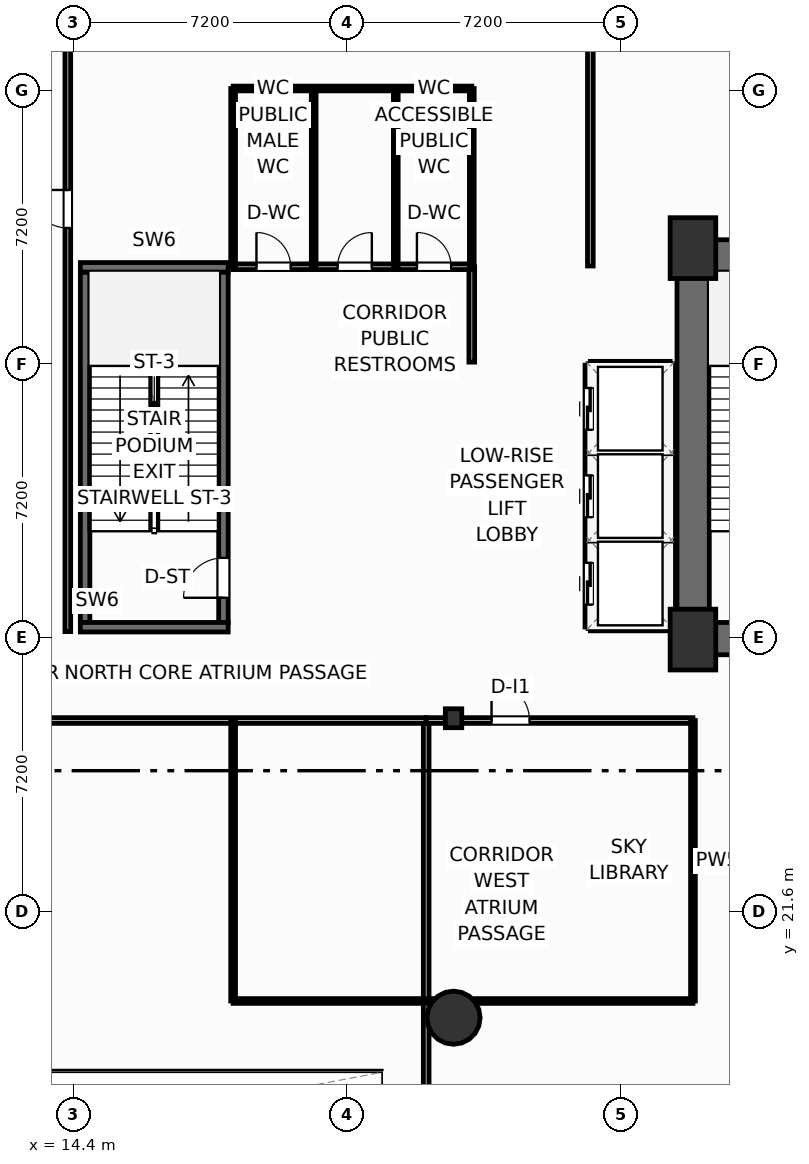
"""IFC4 building model, lengths in metres.
Left out: names, types, materials, properties, quantities, classifications, styles, units other than length and angle.
Written with IfcOpenShell. Run it as: python <this file> out.ifc"""

import sys

from ifc_helpers import new_model, si_unit, direction, frame, frame_2d, origin, origin_2d, place, context, subcontext, project, spatial, rectangle, circle, i_section, extrude, element, fill, save


model = new_model("IFC4")
c1 = context("Model", 3, precision=1e-05, world=origin(), true_north=direction((0.0, 1.0)))
c2 = subcontext(c1, "Body", "Model", "MODEL_VIEW")
j1 = project(units=[si_unit("LENGTHUNIT", "METRE"), si_unit("PLANEANGLEUNIT", "RADIAN")], contexts=[c1])
p1 = place(None, origin())
s1 = spatial("IfcSite", under=j1, at=p1, CompositionType="ELEMENT")
p2 = place(p1, origin())
s2 = spatial("IfcBuilding", under=s1, at=p2, CompositionType="ELEMENT")
p3 = place(p2, frame((0.0, 0.0, 10.8)))
s3 = spatial("IfcBuildingStorey", under=s2, at=p3, CompositionType="ELEMENT", Elevation=10.8)
for number, where, z_axis, x_axis in (
    (1, (30.7, 28.75, 0.0), (0.0, 0.0, 1.0), (1.0, 0.0, 0.0)),
    (2, (30.7, 39.05, 0.0), (0.0, 0.0, 1.0), (1.0, 0.0, 0.0)),
):
    element("IfcColumn", number, at=place(p3, frame(where, z_axis=z_axis, x_axis=x_axis)), inside=s3, PredefinedType="COLUMN", context=c2, shape_type="SweptSolid", body=[
        extrude(rectangle(XDim=1.2, YDim=1.6, at=origin_2d()), origin(), (0.0, 0.0, 1.0), 5.4),
    ])
p4 = place(p3, frame((24.4, 26.68, 0.0), z_axis=(0.0, 0.0, 1.0), x_axis=(1.0, 0.0, 0.0)))
e3 = element("IfcColumn", 3, at=p4, inside=s3, PredefinedType="COLUMN", context=c2, shape_type="SweptSolid", body=[
    extrude(i_section(OverallWidth=0.432, OverallDepth=0.498, WebThickness=0.056, FlangeThickness=0.089, FilletRadius=0.025, at=origin_2d()), origin(), (0.0, 0.0, 1.0), 5.4),
])
p5 = place(p3, frame((30.28, 38.845, 0.0), z_axis=(0.0, 0.0, 1.0), x_axis=(1.0, 0.0, 0.0)))
e4 = element("IfcWall", 4, at=p5, inside=s3, PredefinedType="SHEAR", context=c2, shape_type="SweptSolid", body=[
    extrude(rectangle(XDim=17.84, YDim=0.85, at=frame_2d((8.92, 0.0))), origin(), (0.0, 0.0, 1.0), 5.12),
])
p6 = place(p3, frame((30.705, 29.2, 0.0), z_axis=(0.0, 0.0, 1.0), x_axis=(0.0, 1.0, 0.0)))
e5 = element("IfcWall", 5, at=p6, inside=s3, PredefinedType="SHEAR", context=c2, shape_type="SweptSolid", body=[
    extrude(rectangle(XDim=9.22, YDim=0.85, at=frame_2d((4.61, 0.0))), origin(), (0.0, 0.0, 1.0), 5.12),
])
p7 = place(p3, frame((30.28, 28.775, 0.0), z_axis=(0.0, 0.0, 1.0), x_axis=(1.0, 0.0, 0.0)))
e6 = element("IfcWall", 6, at=p7, inside=s3, PredefinedType="SHEAR", context=c2, shape_type="SweptSolid", body=[
    extrude(rectangle(XDim=4.52, YDim=0.85, at=frame_2d((2.26, 0.0))), origin(), (0.0, 0.0, 1.0), 5.12),
])
p8 = place(p3, frame((14.705, 29.2, 0.0), z_axis=(0.0, 0.0, 1.0), x_axis=(0.0, 1.0, 0.0)))
e7 = element("IfcWall", 7, at=p8, inside=s3, PredefinedType="SHEAR", context=c2, shape_type="SweptSolid", body=[
    extrude(rectangle(XDim=9.22, YDim=0.25, at=frame_2d((4.61, 0.0))), origin(), (0.0, 0.0, 1.0), 5.12),
])
p9 = place(p3, frame((18.345, 29.2, 0.0), z_axis=(0.0, 0.0, 1.0), x_axis=(0.0, 1.0, 0.0)))
e8 = element("IfcWall", 8, at=p9, inside=s3, PredefinedType="SHEAR", context=c2, shape_type="SweptSolid", body=[
    extrude(rectangle(XDim=9.22, YDim=0.25, at=frame_2d((4.61, 0.0))), origin(), (0.0, 0.0, 1.0), 5.12),
])
p10 = place(p9, frame((0.65, 0.0, 0.0)))
e9 = element("IfcOpeningElement", 9, at=p10, cuts=e8, PredefinedType="OPENING", context=c2, shape_type="SweptSolid", body=[
    extrude(rectangle(XDim=1.05, YDim=2.15, at=frame_2d((0.525, 1.075))), frame((0.0, 0.135, 0.0), z_axis=(0.0, -1.0, 0.0), x_axis=(1.0, 0.0, 0.0)), (0.0, 0.0, 1.0), 0.27),
])
for number, where, z_axis, x_axis in (
    (10, (14.58, 38.545, 0.0), (0.0, 0.0, 1.0), (1.0, 0.0, 0.0)),
    (11, (14.58, 29.075, 0.0), (0.0, 0.0, 1.0), (1.0, 0.0, 0.0)),
):
    element("IfcWall", number, at=place(p3, frame(where, z_axis=z_axis, x_axis=x_axis)), inside=s3, PredefinedType="SHEAR", context=c2, shape_type="SweptSolid", body=[
        extrude(rectangle(XDim=3.89, YDim=0.25, at=frame_2d((1.945, 0.0))), origin(), (0.0, 0.0, 1.0), 5.12),
    ])
p11 = place(p3, frame((24.4, 18.8, 0.0), z_axis=(0.0, 0.0, 1.0), x_axis=(1.0, 0.0, 0.0)))
e12 = element("IfcColumn", 12, at=p11, inside=s3, PredefinedType="COLUMN", context=c2, shape_type="SweptSolid", body=[
    extrude(circle(Radius=0.7, at=origin_2d()), origin(), (0.0, 0.0, 1.0), 5.4),
])
p12 = place(p3, frame((24.88, 36.05, 0.0), z_axis=(0.0, 0.0, 1.0), x_axis=(0.0, 1.0, 0.0)))
e13 = element("IfcWall", 13, at=p12, inside=s3, PredefinedType="PARTITIONING", context=c2, shape_type="SweptSolid", body=[
    extrude(rectangle(XDim=2.51, YDim=0.15, at=frame_2d((1.255, 0.0))), origin(), (0.0, 0.0, 1.0), 5.12),
])
p13 = place(p3, frame((18.6, 38.56, 0.0), z_axis=(0.0, 0.0, 1.0), x_axis=(1.0, 0.0, 0.0)))
e14 = element("IfcWall", 14, at=p13, inside=s3, PredefinedType="PARTITIONING", context=c2, shape_type="SweptSolid", body=[
    extrude(rectangle(XDim=6.28, YDim=0.15, at=frame_2d((3.14, 0.0))), origin(), (0.0, 0.0, 1.0), 5.12),
])
p14 = place(p13, frame((0.614, 0.0, 0.0)))
e15 = element("IfcOpeningElement", 15, at=p14, cuts=e14, PredefinedType="OPENING", context=c2, shape_type="SweptSolid", body=[
    extrude(rectangle(XDim=0.9, YDim=2.05, at=frame_2d((0.45, 1.025))), frame((0.0, 0.085, 0.0), z_axis=(0.0, -1.0, 0.0), x_axis=(1.0, 0.0, 0.0)), (0.0, 0.0, 1.0), 0.17),
])
p15 = place(p13, frame((2.75, 0.0, 0.0)))
e16 = element("IfcOpeningElement", 16, at=p15, cuts=e14, PredefinedType="OPENING", context=c2, shape_type="SweptSolid", body=[
    extrude(rectangle(XDim=0.9, YDim=2.05, at=frame_2d((0.45, 1.025))), frame((0.0, 0.085, 0.0), z_axis=(0.0, -1.0, 0.0), x_axis=(1.0, 0.0, 0.0)), (0.0, 0.0, 1.0), 0.17),
])
p16 = place(p13, frame((4.836, 0.0, 0.0)))
e17 = element("IfcOpeningElement", 17, at=p16, cuts=e14, PredefinedType="OPENING", context=c2, shape_type="SweptSolid", body=[
    extrude(rectangle(XDim=0.9, YDim=2.05, at=frame_2d((0.45, 1.025))), frame((0.0, 0.085, 0.0), z_axis=(0.0, -1.0, 0.0), x_axis=(1.0, 0.0, 0.0)), (0.0, 0.0, 1.0), 0.17),
])
for number, where, z_axis, x_axis in (
    (18, (18.6, 38.56, 0.0), (0.0, 0.0, 1.0), (0.0, 1.0, 0.0)),
    (19, (20.72, 38.56, 0.0), (0.0, 0.0, 1.0), (0.0, 1.0, 0.0)),
    (20, (22.88, 38.56, 0.0), (0.0, 0.0, 1.0), (0.0, 1.0, 0.0)),
    (21, (24.88, 38.56, 0.0), (0.0, 0.0, 1.0), (0.0, 1.0, 0.0)),
):
    element("IfcWall", number, at=place(p3, frame(where, z_axis=z_axis, x_axis=x_axis)), inside=s3, PredefinedType="PARTITIONING", context=c2, shape_type="SweptSolid", body=[
        extrude(rectangle(XDim=4.69, YDim=0.125, at=frame_2d((2.345, 0.0))), origin(), (0.0, 0.0, 1.0), 5.12),
    ])
p17 = place(p3, frame((18.6, 43.25, 0.0), z_axis=(0.0, 0.0, 1.0), x_axis=(1.0, 0.0, 0.0)))
e22 = element("IfcWall", 22, at=p17, inside=s3, PredefinedType="PARTITIONING", context=c2, shape_type="SweptSolid", body=[
    extrude(rectangle(XDim=6.28, YDim=0.125, at=frame_2d((3.14, 0.0))), origin(), (0.0, 0.0, 1.0), 5.12),
])
p18 = place(p3, frame((28.0, 38.58, 0.0), z_axis=(0.0, 0.0, 1.0), x_axis=(0.0, 1.0, 0.0)))
e23 = element("IfcWall", 23, at=p18, inside=s3, PredefinedType="PARTITIONING", context=c2, shape_type="SweptSolid", body=[
    extrude(rectangle(XDim=11.62, YDim=0.15, at=frame_2d((5.81, 0.0))), origin(), (0.0, 0.0, 1.0), 5.12),
])
p19 = place(p3, frame((23.68, 0.25, 0.0), z_axis=(0.0, 0.0, 1.0), x_axis=(0.0, 1.0, 0.0)))
e24 = element("IfcWall", 24, at=p19, inside=s3, PredefinedType="PARTITIONING", context=c2, shape_type="SweptSolid", body=[
    extrude(rectangle(XDim=26.37, YDim=0.15, at=frame_2d((13.185, 0.0))), origin(), (0.0, 0.0, 1.0), 5.12),
])
p20 = place(p19, frame((14.514, 0.0, 0.0)))
e25 = element("IfcOpeningElement", 25, at=p20, cuts=e24, PredefinedType="OPENING", context=c2, shape_type="SweptSolid", body=[
    extrude(rectangle(XDim=2.0, YDim=2.05, at=frame_2d((1.0, 1.025))), frame((0.0, 0.085, 0.0), z_axis=(0.0, -1.0, 0.0), x_axis=(1.0, 0.0, 0.0)), (0.0, 0.0, 1.0), 0.17),
])
p21 = place(p3, frame((0.2, 26.62, 0.0), z_axis=(0.0, 0.0, 1.0), x_axis=(1.0, 0.0, 0.0)))
e26 = element("IfcWall", 26, at=p21, inside=s3, PredefinedType="PARTITIONING", context=c2, shape_type="SweptSolid", body=[
    extrude(rectangle(XDim=23.48, YDim=0.15, at=frame_2d((11.74, 0.0))), origin(), (0.0, 0.0, 1.0), 5.12),
])
p22 = place(p3, frame((14.25, 28.96, 0.0), z_axis=(0.0, 0.0, 1.0), x_axis=(0.0, 1.0, 0.0)))
e27 = element("IfcWall", 27, at=p22, inside=s3, PredefinedType="PARTITIONING", context=c2, shape_type="SweptSolid", body=[
    extrude(rectangle(XDim=21.34, YDim=0.15, at=frame_2d((10.67, 0.0))), origin(), (0.0, 0.0, 1.0), 5.12),
])
p23 = place(p22, frame((10.62, 0.0, 0.0)))
e28 = element("IfcOpeningElement", 28, at=p23, cuts=e27, PredefinedType="OPENING", context=c2, shape_type="SweptSolid", body=[
    extrude(rectangle(XDim=1.0, YDim=2.05, at=frame_2d((0.5, 1.025))), frame((0.0, 0.085, 0.0), z_axis=(0.0, -1.0, 0.0), x_axis=(1.0, 0.0, 0.0)), (0.0, 0.0, 1.0), 0.17),
])
p24 = place(p3, frame((23.68, 26.62, 0.0), z_axis=(0.0, 0.0, 1.0), x_axis=(1.0, 0.0, 0.0)))
e29 = element("IfcWall", 29, at=p24, inside=s3, PredefinedType="PARTITIONING", context=c2, shape_type="SweptSolid", body=[
    extrude(rectangle(XDim=7.02, YDim=0.15, at=frame_2d((3.51, 0.0))), origin(), (0.0, 0.0, 1.0), 4.332),
])
p25 = place(p24, frame((1.72, 0.0, 0.0)))
e30 = element("IfcOpeningElement", 30, at=p25, cuts=e29, PredefinedType="OPENING", context=c2, shape_type="SweptSolid", body=[
    extrude(rectangle(XDim=1.0, YDim=2.05, at=frame_2d((0.5, 1.025))), frame((0.0, 0.085, 0.0), z_axis=(0.0, -1.0, 0.0), x_axis=(1.0, 0.0, 0.0)), (0.0, 0.0, 1.0), 0.17),
])
p26 = place(p3, frame((30.7, 19.24, 0.0), z_axis=(0.0, 0.0, 1.0), x_axis=(0.0, 1.0, 0.0)))
e31 = element("IfcWall", 31, at=p26, inside=s3, PredefinedType="PARTITIONING", context=c2, shape_type="SweptSolid", body=[
    extrude(rectangle(XDim=7.38, YDim=0.125, at=frame_2d((3.69, 0.0))), origin(), (0.0, 0.0, 1.0), 5.12),
])
p27 = place(p3, frame((18.6, 19.24, 0.0), z_axis=(0.0, 0.0, 1.0), x_axis=(0.0, 1.0, 0.0)))
e32 = element("IfcWall", 32, at=p27, inside=s3, PredefinedType="PARTITIONING", context=c2, shape_type="SweptSolid", body=[
    extrude(rectangle(XDim=7.34, YDim=0.125, at=frame_2d((3.67, 0.0))), origin(), (0.0, 0.0, 1.0), 5.12),
])
p28 = place(p3, frame((18.6, 19.24, 0.0), z_axis=(0.0, 0.0, 1.0), x_axis=(1.0, 0.0, 0.0)))
e33 = element("IfcWall", 33, at=p28, inside=s3, PredefinedType="PARTITIONING", context=c2, shape_type="SweptSolid", body=[
    extrude(rectangle(XDim=12.1, YDim=0.125, at=frame_2d((6.05, 0.0))), origin(), (0.0, 0.0, 1.0), 5.12),
])
for number, where, z_axis, x_axis in (
    (34, (28.02, 31.375, 0.0), (0.0, 0.0, 1.0), (1.0, 0.0, 0.0)),
    (35, (28.02, 33.675, 0.0), (0.0, 0.0, 1.0), (1.0, 0.0, 0.0)),
):
    element("IfcWall", number, at=place(p3, frame(where, z_axis=z_axis, x_axis=x_axis)), inside=s3, PredefinedType="PARTITIONING", context=c2, shape_type="SweptSolid", body=[
        extrude(rectangle(XDim=2.06, YDim=0.2, at=frame_2d((1.03, 0.0))), origin(), (0.0, 0.0, 1.0), 5.12),
    ])
for number, where, z_axis, x_axis in (
    (36, (28.0, 29.08, 0.0), (0.0, 0.0, 1.0), (1.0, 0.0, 0.0)),
    (37, (28.0, 35.97, 0.0), (0.0, 0.0, 1.0), (1.0, 0.0, 0.0)),
):
    element("IfcWall", number, at=place(p3, frame(where, z_axis=z_axis, x_axis=x_axis)), inside=s3, PredefinedType="PARTITIONING", context=c2, shape_type="SweptSolid", body=[
        extrude(rectangle(XDim=2.1, YDim=0.2, at=frame_2d((1.05, 0.0))), origin(), (0.0, 0.0, 1.0), 5.12),
    ])
p29 = place(p3, frame((30.12, 29.08, 0.0), z_axis=(0.0, 0.0, 1.0), x_axis=(0.0, 1.0, 0.0)))
e38 = element("IfcWall", 38, at=p29, inside=s3, PredefinedType="PARTITIONING", context=c2, shape_type="SweptSolid", body=[
    extrude(rectangle(XDim=6.89, YDim=0.2, at=frame_2d((3.445, 0.0))), origin(), (0.0, 0.0, 1.0), 5.12),
])
p30 = place(p3, frame((27.96, 29.08, 0.0), z_axis=(0.0, 0.0, 1.0), x_axis=(0.0, 1.0, 0.0)))
e39 = element("IfcWall", 39, at=p30, inside=s3, PredefinedType="PARTITIONING", context=c2, shape_type="SweptSolid", body=[
    extrude(rectangle(XDim=6.89, YDim=0.2, at=frame_2d((3.445, 0.0))), origin(), (0.0, 0.0, 1.0), 5.12),
])
p31 = place(p30, frame((0.59, 0.0, 0.0)))
e40 = element("IfcOpeningElement", 40, at=p31, cuts=e39, PredefinedType="OPENING", context=c2, shape_type="SweptSolid", body=[
    extrude(rectangle(XDim=1.1, YDim=2.15, at=frame_2d((0.55, 1.075))), frame((0.0, 0.11, 0.0), z_axis=(0.0, -1.0, 0.0), x_axis=(1.0, 0.0, 0.0)), (0.0, 0.0, 1.0), 0.22),
])
p32 = place(p30, frame((2.89, 0.0, 0.0)))
e41 = element("IfcOpeningElement", 41, at=p32, cuts=e39, PredefinedType="OPENING", context=c2, shape_type="SweptSolid", body=[
    extrude(rectangle(XDim=1.1, YDim=2.15, at=frame_2d((0.55, 1.075))), frame((0.0, 0.11, 0.0), z_axis=(0.0, -1.0, 0.0), x_axis=(1.0, 0.0, 0.0)), (0.0, 0.0, 1.0), 0.22),
])
p33 = place(p30, frame((5.19, 0.0, 0.0)))
e42 = element("IfcOpeningElement", 42, at=p33, cuts=e39, PredefinedType="OPENING", context=c2, shape_type="SweptSolid", body=[
    extrude(rectangle(XDim=1.1, YDim=2.15, at=frame_2d((0.55, 1.075))), frame((0.0, 0.11, 0.0), z_axis=(0.0, -1.0, 0.0), x_axis=(1.0, 0.0, 0.0)), (0.0, 0.0, 1.0), 0.22),
])
p34 = place(p14, origin())
e43 = element("IfcDoor", 43, at=p34, inside=s3, OperationType="SINGLE_SWING_LEFT", PredefinedType="DOOR", context=c2, shape_type="SweptSolid", body=[
    extrude(rectangle(XDim=0.9, YDim=2.05, at=frame_2d((0.45, 1.025))), frame((0.0, 0.025, 0.0), z_axis=(0.0, -1.0, 0.0), x_axis=(1.0, 0.0, 0.0)), (0.0, 0.0, 1.0), 0.05),
])
fill(e15, e43)
p35 = place(p15, origin())
e44 = element("IfcDoor", 44, at=p35, inside=s3, OperationType="SINGLE_SWING_RIGHT", PredefinedType="DOOR", context=c2, shape_type="SweptSolid", body=[
    extrude(rectangle(XDim=0.9, YDim=2.05, at=frame_2d((0.45, 1.025))), frame((0.0, 0.025, 0.0), z_axis=(0.0, -1.0, 0.0), x_axis=(1.0, 0.0, 0.0)), (0.0, 0.0, 1.0), 0.05),
])
fill(e16, e44)
p36 = place(p16, origin())
e45 = element("IfcDoor", 45, at=p36, inside=s3, OperationType="SINGLE_SWING_LEFT", PredefinedType="DOOR", context=c2, shape_type="SweptSolid", body=[
    extrude(rectangle(XDim=0.9, YDim=2.05, at=frame_2d((0.45, 1.025))), frame((0.0, 0.025, 0.0), z_axis=(0.0, -1.0, 0.0), x_axis=(1.0, 0.0, 0.0)), (0.0, 0.0, 1.0), 0.05),
])
fill(e17, e45)
p37 = place(p23, origin())
e46 = element("IfcDoor", 46, at=p37, inside=s3, OperationType="SINGLE_SWING_RIGHT", PredefinedType="DOOR", context=c2, shape_type="SweptSolid", body=[
    extrude(rectangle(XDim=1.0, YDim=2.05, at=frame_2d((0.5, 1.025))), frame((0.0, 0.025, 0.0), z_axis=(0.0, -1.0, 0.0), x_axis=(1.0, 0.0, 0.0)), (0.0, 0.0, 1.0), 0.05),
])
fill(e28, e46)
p38 = place(p25, origin())
e47 = element("IfcDoor", 47, at=p38, inside=s3, OperationType="SINGLE_SWING_LEFT", PredefinedType="DOOR", context=c2, shape_type="SweptSolid", body=[
    extrude(rectangle(XDim=1.0, YDim=2.05, at=frame_2d((0.5, 1.025))), frame((0.0, 0.025, 0.0), z_axis=(0.0, -1.0, 0.0), x_axis=(1.0, 0.0, 0.0)), (0.0, 0.0, 1.0), 0.05),
])
fill(e30, e47)
p39 = place(p10, origin())
e48 = element("IfcDoor", 48, at=p39, inside=s3, OperationType="SINGLE_SWING_LEFT", PredefinedType="DOOR", context=c2, shape_type="SweptSolid", body=[
    extrude(rectangle(XDim=1.05, YDim=2.15, at=frame_2d((0.525, 1.075))), frame((0.0, 0.025, 0.0), z_axis=(0.0, -1.0, 0.0), x_axis=(1.0, 0.0, 0.0)), (0.0, 0.0, 1.0), 0.05),
])
fill(e9, e48)
p40 = place(p31, origin())
e49 = element("IfcDoor", 49, at=p40, inside=s3, OperationType="SLIDING_TO_LEFT", PredefinedType="DOOR", context=c2, shape_type="SweptSolid", body=[
    extrude(rectangle(XDim=1.1, YDim=2.15, at=frame_2d((0.55, 1.075))), frame((0.0, 0.025, 0.0), z_axis=(0.0, -1.0, 0.0), x_axis=(1.0, 0.0, 0.0)), (0.0, 0.0, 1.0), 0.05),
])
fill(e40, e49)
p41 = place(p32, origin())
e50 = element("IfcDoor", 50, at=p41, inside=s3, OperationType="SLIDING_TO_LEFT", PredefinedType="DOOR", context=c2, shape_type="SweptSolid", body=[
    extrude(rectangle(XDim=1.1, YDim=2.15, at=frame_2d((0.55, 1.075))), frame((0.0, 0.025, 0.0), z_axis=(0.0, -1.0, 0.0), x_axis=(1.0, 0.0, 0.0)), (0.0, 0.0, 1.0), 0.05),
])
fill(e41, e50)
p42 = place(p33, origin())
e51 = element("IfcDoor", 51, at=p42, inside=s3, OperationType="SLIDING_TO_LEFT", PredefinedType="DOOR", context=c2, shape_type="SweptSolid", body=[
    extrude(rectangle(XDim=1.1, YDim=2.15, at=frame_2d((0.55, 1.075))), frame((0.0, 0.025, 0.0), z_axis=(0.0, -1.0, 0.0), x_axis=(1.0, 0.0, 0.0)), (0.0, 0.0, 1.0), 0.05),
])
fill(e42, e51)
save(model, sys.argv[1])
